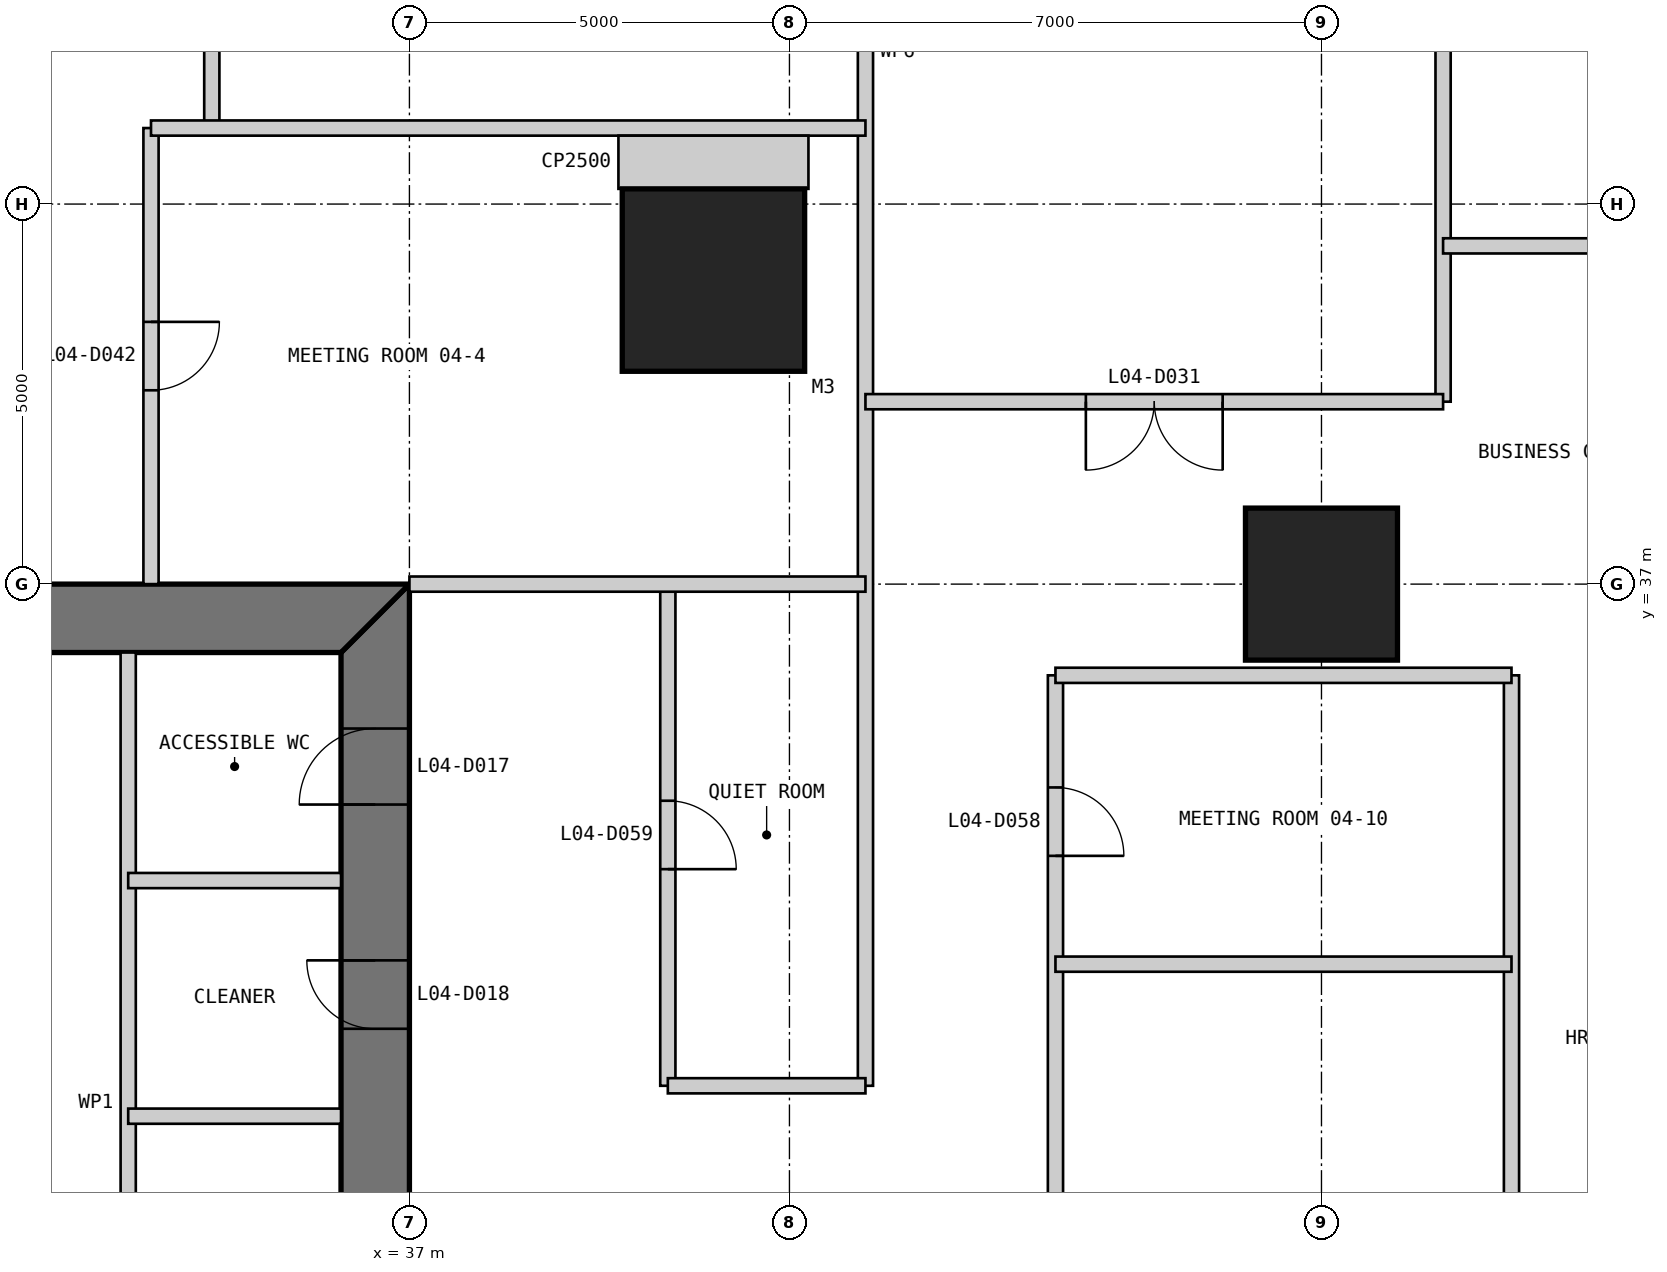
"""IFC4 building model, lengths in metres.
Left out: names, types, materials, properties, quantities, classifications, styles, units other than length and angle.
Written with IfcOpenShell. Run it as: python <this file> out.ifc"""

import sys

from ifc_helpers import new_model, si_unit, direction, frame, frame_2d, origin, origin_2d, place, context, subcontext, project, spatial, polyline, rectangle, outline, extrude, element, fill, save


model = new_model("IFC4")
c1 = context("Model", 3, precision=1e-05, world=origin(), true_north=direction((0.0, 1.0)))
c2 = subcontext(c1, "Body", "Model", "MODEL_VIEW")
j1 = project(units=[si_unit("LENGTHUNIT", "METRE"), si_unit("PLANEANGLEUNIT", "RADIAN")], contexts=[c1])
p1 = place(None, origin())
s1 = spatial("IfcSite", under=j1, at=p1, CompositionType="ELEMENT")
p2 = place(p1, origin())
s2 = spatial("IfcBuilding", under=s1, at=p2, CompositionType="ELEMENT")
p3 = place(p2, frame((0.0, 0.0, 21.4)))
s3 = spatial("IfcBuildingStorey", under=s2, at=p3, CompositionType="ELEMENT", Elevation=21.4)
p4 = place(p3, frame((41.0, 41.0, 0.0), z_axis=(0.0, 0.0, 1.0), x_axis=(1.0, 0.0, 0.0)))
e1 = element("IfcColumn", 1, at=p4, inside=s3, PredefinedType="COLUMN", context=c2, shape_type="SweptSolid", body=[
    extrude(rectangle(XDim=2.4, YDim=2.4, at=origin_2d()), origin(), (0.0, 0.0, 1.0), 4.8),
])
p5 = place(p3, frame((49.0, 37.0, 0.0), z_axis=(0.0, 0.0, 1.0), x_axis=(1.0, 0.0, 0.0)))
e2 = element("IfcColumn", 2, at=p5, inside=s3, PredefinedType="COLUMN", context=c2, shape_type="SweptSolid", body=[
    extrude(rectangle(XDim=2.0, YDim=2.0, at=origin_2d()), origin(), (0.0, 0.0, 1.0), 4.8),
])
p6 = place(p3, frame((36.55, 13.9, 0.0), z_axis=(0.0, 0.0, 1.0), x_axis=(0.0, 1.0, 0.0)))
e3 = element("IfcWall", 3, at=p6, inside=s3, PredefinedType="SHEAR", context=c2, shape_type="SweptSolid", body=[
    extrude(outline(polyline([(-0.9, -0.45), (23.1, -0.45), (22.2, 0.45), (0.0, 0.45), (-0.9, -0.45)])), origin(), (0.0, 0.0, 1.0), 4.8),
])
p7 = place(p6, frame((20.2, 0.0, 0.0)))
e4 = element("IfcOpeningElement", 4, at=p7, cuts=e3, PredefinedType="OPENING", context=c2, shape_type="SweptSolid", body=[
    extrude(rectangle(XDim=1.0, YDim=2.2, at=frame_2d((0.5, 1.1))), frame((0.0, 0.46, 0.0), z_axis=(0.0, -1.0, 0.0), x_axis=(1.0, 0.0, 0.0)), (0.0, 0.0, 1.0), 0.92),
])
p8 = place(p6, frame((17.25, 0.0, 0.0)))
e5 = element("IfcOpeningElement", 5, at=p8, cuts=e3, PredefinedType="OPENING", context=c2, shape_type="SweptSolid", body=[
    extrude(rectangle(XDim=0.9, YDim=2.2, at=frame_2d((0.45, 1.1))), frame((0.0, 0.46, 0.0), z_axis=(0.0, -1.0, 0.0), x_axis=(1.0, 0.0, 0.0)), (0.0, 0.0, 1.0), 0.92),
])
p9 = place(p3, frame((37.0, 36.55, 0.0), z_axis=(0.0, 0.0, 1.0), x_axis=(-1.0, 0.0, 0.0)))
e6 = element("IfcWall", 6, at=p9, inside=s3, PredefinedType="SHEAR", context=c2, shape_type="SweptSolid", body=[
    extrude(outline(polyline([(0.0, -0.45), (24.0, -0.45), (23.1, 0.45), (0.9, 0.45), (0.0, -0.45)])), origin(), (0.0, 0.0, 1.0), 4.8),
])
p10 = place(p9, frame((4.9, 0.0, 0.0)))
e7 = element("IfcOpeningElement", 7, at=p10, cuts=e6, PredefinedType="OPENING", context=c2, shape_type="SweptSolid", body=[
    extrude(rectangle(XDim=1.0, YDim=2.2, at=frame_2d((0.5, 1.1))), frame((0.0, 0.46, 0.0), z_axis=(0.0, -1.0, 0.0), x_axis=(1.0, 0.0, 0.0)), (0.0, 0.0, 1.0), 0.92),
])
p11 = place(p9, frame((8.9, 0.0, 0.0)))
e8 = element("IfcOpeningElement", 8, at=p11, cuts=e6, PredefinedType="OPENING", context=c2, shape_type="SweptSolid", body=[
    extrude(rectangle(XDim=1.1, YDim=2.2, at=frame_2d((0.55, 1.1))), frame((0.0, 0.46, 0.0), z_axis=(0.0, -1.0, 0.0), x_axis=(1.0, 0.0, 0.0)), (0.0, 0.0, 1.0), 0.92),
])
p12 = place(p9, frame((15.05, 0.0, 0.0)))
e9 = element("IfcOpeningElement", 9, at=p12, cuts=e6, PredefinedType="OPENING", context=c2, shape_type="SweptSolid", body=[
    extrude(rectangle(XDim=0.9, YDim=2.2, at=frame_2d((0.45, 1.1))), frame((0.0, 0.46, 0.0), z_axis=(0.0, -1.0, 0.0), x_axis=(1.0, 0.0, 0.0)), (0.0, 0.0, 1.0), 0.92),
])
p13 = place(p9, frame((17.9, 0.0, 0.0)))
e10 = element("IfcOpeningElement", 10, at=p13, cuts=e6, PredefinedType="OPENING", context=c2, shape_type="SweptSolid", body=[
    extrude(rectangle(XDim=1.0, YDim=2.2, at=frame_2d((0.5, 1.1))), frame((0.0, 0.46, 0.0), z_axis=(0.0, -1.0, 0.0), x_axis=(1.0, 0.0, 0.0)), (0.0, 0.0, 1.0), 0.92),
])
p14 = place(p9, frame((21.4, 0.0, 0.0)))
e11 = element("IfcOpeningElement", 11, at=p14, cuts=e6, PredefinedType="OPENING", context=c2, shape_type="SweptSolid", body=[
    extrude(rectangle(XDim=1.0, YDim=2.2, at=frame_2d((0.5, 1.1))), frame((0.0, 0.46, 0.0), z_axis=(0.0, -1.0, 0.0), x_axis=(1.0, 0.0, 0.0)), (0.0, 0.0, 1.0), 0.92),
])
p15 = place(p3, frame((33.3, 36.1, 0.0), z_axis=(0.0, 0.0, 1.0), x_axis=(0.0, -1.0, 0.0)))
e12 = element("IfcWall", 12, at=p15, inside=s3, PredefinedType="PARTITIONING", context=c2, shape_type="SweptSolid", body=[
    extrude(rectangle(XDim=16.1, YDim=0.2, at=frame_2d((8.05, 0.0))), origin(), (0.0, 0.0, 1.0), 4.6),
])
for number, where, z_axis, x_axis in (
    (13, (36.1, 30.0, 0.0), (0.0, 0.0, 1.0), (-1.0, 0.0, 0.0)),
    (14, (36.1, 33.1, 0.0), (0.0, 0.0, 1.0), (-1.0, 0.0, 0.0)),
):
    element("IfcWall", number, at=place(p3, frame(where, z_axis=z_axis, x_axis=x_axis)), inside=s3, PredefinedType="PARTITIONING", context=c2, shape_type="SweptSolid", body=[
        extrude(rectangle(XDim=2.8, YDim=0.2, at=frame_2d((1.4, 0.0))), origin(), (0.0, 0.0, 1.0), 4.6),
    ])
p16 = place(p3, frame((33.6, 37.0, 0.0), z_axis=(0.0, 0.0, 1.0), x_axis=(0.0, 1.0, 0.0)))
e15 = element("IfcWall", 15, at=p16, inside=s3, PredefinedType="PARTITIONING", context=c2, shape_type="SweptSolid", body=[
    extrude(rectangle(XDim=6.0, YDim=0.2, at=frame_2d((3.0, 0.0))), origin(), (0.0, 0.0, 1.0), 4.5),
])
p17 = place(p16, frame((2.55, 0.0, 0.0)))
e16 = element("IfcOpeningElement", 16, at=p17, cuts=e15, PredefinedType="OPENING", context=c2, shape_type="SweptSolid", body=[
    extrude(rectangle(XDim=0.9, YDim=2.2, at=frame_2d((0.45, 1.1))), frame((0.0, 0.11, 0.0), z_axis=(0.0, -1.0, 0.0), x_axis=(1.0, 0.0, 0.0)), (0.0, 0.0, 1.0), 0.22),
])
p18 = place(p3, frame((34.4, 43.0, 0.0), z_axis=(0.0, 0.0, 1.0), x_axis=(0.0, 1.0, 0.0)))
e17 = element("IfcWall", 17, at=p18, inside=s3, PredefinedType="PARTITIONING", context=c2, shape_type="SweptSolid", body=[
    extrude(rectangle(XDim=22.25, YDim=0.2, at=frame_2d((11.125, 0.0))), origin(), (0.0, 0.0, 1.0), 4.5),
])
p19 = place(p18, frame((6.425, 0.0, 0.0)))
e18 = element("IfcOpeningElement", 18, at=p19, cuts=e17, PredefinedType="OPENING", context=c2, shape_type="SweptSolid", body=[
    extrude(rectangle(XDim=1.8, YDim=2.4, at=frame_2d((0.9, 1.2))), frame((0.0, 0.11, 0.0), z_axis=(0.0, -1.0, 0.0), x_axis=(1.0, 0.0, 0.0)), (0.0, 0.0, 1.0), 0.22),
])
p20 = place(p18, frame((17.5, 0.0, 0.0)))
e19 = element("IfcOpeningElement", 19, at=p20, cuts=e17, PredefinedType="OPENING", context=c2, shape_type="SweptSolid", body=[
    extrude(rectangle(XDim=1.8, YDim=2.4, at=frame_2d((0.9, 1.2))), frame((0.0, 0.11, 0.0), z_axis=(0.0, -1.0, 0.0), x_axis=(1.0, 0.0, 0.0)), (0.0, 0.0, 1.0), 0.22),
])
p21 = place(p3, frame((40.4, 30.4, 0.0), z_axis=(0.0, 0.0, 1.0), x_axis=(0.0, 1.0, 0.0)))
e20 = element("IfcWall", 20, at=p21, inside=s3, PredefinedType="PARTITIONING", context=c2, shape_type="SweptSolid", body=[
    extrude(rectangle(XDim=6.6, YDim=0.2, at=frame_2d((3.3, 0.0))), origin(), (0.0, 0.0, 1.0), 4.5),
])
p22 = place(p21, frame((2.85, 0.0, 0.0)))
e21 = element("IfcOpeningElement", 21, at=p22, cuts=e20, PredefinedType="OPENING", context=c2, shape_type="SweptSolid", body=[
    extrude(rectangle(XDim=0.9, YDim=2.2, at=frame_2d((0.45, 1.1))), frame((0.0, 0.11, 0.0), z_axis=(0.0, -1.0, 0.0), x_axis=(1.0, 0.0, 0.0)), (0.0, 0.0, 1.0), 0.22),
])
p23 = place(p3, frame((43.0, 30.4, 0.0), z_axis=(0.0, 0.0, 1.0), x_axis=(0.0, 1.0, 0.0)))
e22 = element("IfcWall", 22, at=p23, inside=s3, PredefinedType="PARTITIONING", context=c2, shape_type="SweptSolid", body=[
    extrude(rectangle(XDim=27.2, YDim=0.2, at=frame_2d((13.6, 0.0))), origin(), (0.0, 0.0, 1.0), 3.843),
])
p24 = place(p3, frame((45.5, 17.8, 0.0), z_axis=(0.0, 0.0, 1.0), x_axis=(0.0, 1.0, 0.0)))
e23 = element("IfcWall", 23, at=p24, inside=s3, PredefinedType="PARTITIONING", context=c2, shape_type="SweptSolid", body=[
    extrude(rectangle(XDim=18.0, YDim=0.2, at=frame_2d((9.0, 0.0))), origin(), (0.0, 0.0, 1.0), 4.5),
])
p25 = place(p24, frame((8.3, 0.0, 0.0)))
e24 = element("IfcOpeningElement", 24, at=p25, cuts=e23, PredefinedType="OPENING", context=c2, shape_type="SweptSolid", body=[
    extrude(rectangle(XDim=1.8, YDim=2.4, at=frame_2d((0.9, 1.2))), frame((0.0, 0.11, 0.0), z_axis=(0.0, -1.0, 0.0), x_axis=(1.0, 0.0, 0.0)), (0.0, 0.0, 1.0), 0.22),
])
p26 = place(p24, frame((1.675, 0.0, 0.0)))
e25 = element("IfcOpeningElement", 25, at=p26, cuts=e23, PredefinedType="OPENING", context=c2, shape_type="SweptSolid", body=[
    extrude(rectangle(XDim=0.9, YDim=2.2, at=frame_2d((0.45, 1.1))), frame((0.0, 0.11, 0.0), z_axis=(0.0, -1.0, 0.0), x_axis=(1.0, 0.0, 0.0)), (0.0, 0.0, 1.0), 0.22),
])
p27 = place(p24, frame((15.625, 0.0, 0.0)))
e26 = element("IfcOpeningElement", 26, at=p27, cuts=e23, PredefinedType="OPENING", context=c2, shape_type="SweptSolid", body=[
    extrude(rectangle(XDim=0.9, YDim=2.2, at=frame_2d((0.45, 1.1))), frame((0.0, 0.11, 0.0), z_axis=(0.0, -1.0, 0.0), x_axis=(1.0, 0.0, 0.0)), (0.0, 0.0, 1.0), 0.22),
])
p28 = place(p3, frame((50.6, 39.4, 0.0), z_axis=(0.0, 0.0, 1.0), x_axis=(0.0, 1.0, 0.0)))
e27 = element("IfcWall", 27, at=p28, inside=s3, PredefinedType="PARTITIONING", context=c2, shape_type="SweptSolid", body=[
    extrude(rectangle(XDim=25.85, YDim=0.2, at=frame_2d((12.925, 0.0))), origin(), (0.0, 0.0, 1.0), 4.5),
])
p29 = place(p3, frame((51.5, 17.8, 0.0), z_axis=(0.0, 0.0, 1.0), x_axis=(0.0, 1.0, 0.0)))
e28 = element("IfcWall", 28, at=p29, inside=s3, PredefinedType="PARTITIONING", context=c2, shape_type="SweptSolid", body=[
    extrude(rectangle(XDim=18.0, YDim=0.2, at=frame_2d((9.0, 0.0))), origin(), (0.0, 0.0, 1.0), 4.5),
])
p30 = place(p3, frame((40.4, 30.4, 0.0), z_axis=(0.0, 0.0, 1.0), x_axis=(1.0, 0.0, 0.0)))
e29 = element("IfcWall", 29, at=p30, inside=s3, PredefinedType="PARTITIONING", context=c2, shape_type="SweptSolid", body=[
    extrude(rectangle(XDim=2.6, YDim=0.2, at=frame_2d((1.3, 0.0))), origin(), (0.0, 0.0, 1.0), 4.5),
])
for number, where, z_axis, x_axis in (
    (30, (45.5, 32.0, 0.0), (0.0, 0.0, 1.0), (1.0, 0.0, 0.0)),
    (31, (45.5, 35.8, 0.0), (0.0, 0.0, 1.0), (1.0, 0.0, 0.0)),
):
    element("IfcWall", number, at=place(p3, frame(where, z_axis=z_axis, x_axis=x_axis)), inside=s3, PredefinedType="PARTITIONING", context=c2, shape_type="SweptSolid", body=[
        extrude(rectangle(XDim=6.0, YDim=0.2, at=frame_2d((3.0, 0.0))), origin(), (0.0, 0.0, 1.0), 4.5),
    ])
p31 = place(p3, frame((37.0, 37.0, 0.0), z_axis=(0.0, 0.0, 1.0), x_axis=(1.0, 0.0, 0.0)))
e32 = element("IfcWall", 32, at=p31, inside=s3, PredefinedType="PARTITIONING", context=c2, shape_type="SweptSolid", body=[
    extrude(rectangle(XDim=6.0, YDim=0.2, at=frame_2d((3.0, 0.0))), origin(), (0.0, 0.0, 1.0), 3.653),
])
p32 = place(p3, frame((43.0, 39.4, 0.0), z_axis=(0.0, 0.0, 1.0), x_axis=(1.0, 0.0, 0.0)))
e33 = element("IfcWall", 33, at=p32, inside=s3, PredefinedType="PARTITIONING", context=c2, shape_type="SweptSolid", body=[
    extrude(rectangle(XDim=7.6, YDim=0.2, at=frame_2d((3.8, 0.0))), origin(), (0.0, 0.0, 1.0), 4.5),
])
p33 = place(p32, frame((2.9, 0.0, 0.0)))
e34 = element("IfcOpeningElement", 34, at=p33, cuts=e33, PredefinedType="OPENING", context=c2, shape_type="SweptSolid", body=[
    extrude(rectangle(XDim=1.8, YDim=2.4, at=frame_2d((0.9, 1.2))), frame((0.0, 0.11, 0.0), z_axis=(0.0, -1.0, 0.0), x_axis=(1.0, 0.0, 0.0)), (0.0, 0.0, 1.0), 0.22),
])
p34 = place(p3, frame((50.6, 41.45, 0.0), z_axis=(0.0, 0.0, 1.0), x_axis=(1.0, 0.0, 0.0)))
e35 = element("IfcWall", 35, at=p34, inside=s3, PredefinedType="PARTITIONING", context=c2, shape_type="SweptSolid", body=[
    extrude(rectangle(XDim=6.65, YDim=0.2, at=frame_2d((3.325, 0.0))), origin(), (0.0, 0.0, 1.0), 4.5),
])
p35 = place(p34, frame((2.425, 0.0, 0.0)))
e36 = element("IfcOpeningElement", 36, at=p35, cuts=e35, PredefinedType="OPENING", context=c2, shape_type="SweptSolid", body=[
    extrude(rectangle(XDim=1.8, YDim=2.4, at=frame_2d((0.9, 1.2))), frame((0.0, 0.11, 0.0), z_axis=(0.0, -1.0, 0.0), x_axis=(1.0, 0.0, 0.0)), (0.0, 0.0, 1.0), 0.22),
])
p36 = place(p3, frame((33.6, 43.0, 0.0), z_axis=(0.0, 0.0, 1.0), x_axis=(1.0, 0.0, 0.0)))
e37 = element("IfcWall", 37, at=p36, inside=s3, PredefinedType="PARTITIONING", context=c2, shape_type="SweptSolid", body=[
    extrude(rectangle(XDim=9.4, YDim=0.2, at=frame_2d((4.7, 0.0))), origin(), (0.0, 0.0, 1.0), 4.5),
])
p37 = place(p3, frame((41.0, 42.9, 0.0), z_axis=(0.0, 0.0, 1.0), x_axis=(0.0, -1.0, 0.0)))
e38 = element("IfcWall", 38, at=p37, inside=s3, PredefinedType="PARTITIONING", context=c2, shape_type="SweptSolid", body=[
    extrude(rectangle(XDim=0.7, YDim=2.5, at=frame_2d((0.35, 0.0))), origin(), (0.0, 0.0, 1.0), 4.5),
])
p38 = place(p7, origin())
e39 = element("IfcDoor", 39, at=p38, inside=s3, OperationType="SINGLE_SWING_LEFT", PredefinedType="DOOR", context=c2, shape_type="SweptSolid", body=[
    extrude(rectangle(XDim=1.0, YDim=2.2, at=frame_2d((0.5, 1.1))), frame((0.0, 0.025, 0.0), z_axis=(0.0, -1.0, 0.0), x_axis=(1.0, 0.0, 0.0)), (0.0, 0.0, 1.0), 0.05),
    extrude(outline(polyline([(0.0, 0.0), (0.04, 0.0), (0.04, 2.16), (0.96, 2.16), (0.96, 0.0), (1.0, 0.0), (1.0, 2.2), (0.0, 2.2), (0.0, 0.0)])), frame((0.0, 0.3, 0.0), z_axis=(0.0, -1.0, 0.0), x_axis=(1.0, 0.0, 0.0)), (0.0, 0.0, 1.0), 0.6),
])
fill(e4, e39)
p39 = place(p8, origin())
e40 = element("IfcDoor", 40, at=p39, inside=s3, OperationType="SINGLE_SWING_RIGHT", PredefinedType="DOOR", context=c2, shape_type="SweptSolid", body=[
    extrude(rectangle(XDim=0.9, YDim=2.2, at=frame_2d((0.45, 1.1))), frame((0.0, 0.025, 0.0), z_axis=(0.0, -1.0, 0.0), x_axis=(1.0, 0.0, 0.0)), (0.0, 0.0, 1.0), 0.05),
    extrude(outline(polyline([(0.0, 0.0), (0.04, 0.0), (0.04, 2.16), (0.86, 2.16), (0.86, 0.0), (0.9, 0.0), (0.9, 2.2), (0.0, 2.2), (0.0, 0.0)])), frame((0.0, 0.3, 0.0), z_axis=(0.0, -1.0, 0.0), x_axis=(1.0, 0.0, 0.0)), (0.0, 0.0, 1.0), 0.6),
])
fill(e5, e40)
p40 = place(p33, frame((1.8, 0.0, 0.0), z_axis=(0.0, 0.0, 1.0), x_axis=(-1.0, 0.0, 0.0)))
e41 = element("IfcDoor", 41, at=p40, inside=s3, OperationType="DOUBLE_DOOR_SINGLE_SWING", PredefinedType="DOOR", context=c2, shape_type="SweptSolid", body=[
    extrude(rectangle(XDim=1.8, YDim=2.4, at=frame_2d((0.9, 1.2))), frame((0.0, 0.025, 0.0), z_axis=(0.0, -1.0, 0.0), x_axis=(1.0, 0.0, 0.0)), (0.0, 0.0, 1.0), 0.05),
])
fill(e34, e41)
p41 = place(p17, frame((0.9, 0.0, 0.0), z_axis=(0.0, 0.0, 1.0), x_axis=(-1.0, 0.0, 0.0)))
e42 = element("IfcDoor", 42, at=p41, inside=s3, OperationType="SINGLE_SWING_LEFT", PredefinedType="DOOR", context=c2, shape_type="SweptSolid", body=[
    extrude(rectangle(XDim=0.9, YDim=2.2, at=frame_2d((0.45, 1.1))), frame((0.0, 0.025, 0.0), z_axis=(0.0, -1.0, 0.0), x_axis=(1.0, 0.0, 0.0)), (0.0, 0.0, 1.0), 0.05),
])
fill(e16, e42)
p42 = place(p27, frame((0.9, 0.0, 0.0), z_axis=(0.0, 0.0, 1.0), x_axis=(-1.0, 0.0, 0.0)))
e43 = element("IfcDoor", 43, at=p42, inside=s3, OperationType="SINGLE_SWING_RIGHT", PredefinedType="DOOR", context=c2, shape_type="SweptSolid", body=[
    extrude(rectangle(XDim=0.9, YDim=2.2, at=frame_2d((0.45, 1.1))), frame((0.0, 0.025, 0.0), z_axis=(0.0, -1.0, 0.0), x_axis=(1.0, 0.0, 0.0)), (0.0, 0.0, 1.0), 0.05),
])
fill(e26, e43)
p43 = place(p22, frame((0.9, 0.0, 0.0), z_axis=(0.0, 0.0, 1.0), x_axis=(-1.0, 0.0, 0.0)))
e44 = element("IfcDoor", 44, at=p43, inside=s3, OperationType="SINGLE_SWING_RIGHT", PredefinedType="DOOR", context=c2, shape_type="SweptSolid", body=[
    extrude(rectangle(XDim=0.9, YDim=2.2, at=frame_2d((0.45, 1.1))), frame((0.0, 0.025, 0.0), z_axis=(0.0, -1.0, 0.0), x_axis=(1.0, 0.0, 0.0)), (0.0, 0.0, 1.0), 0.05),
])
fill(e21, e44)
save(model, sys.argv[1])
